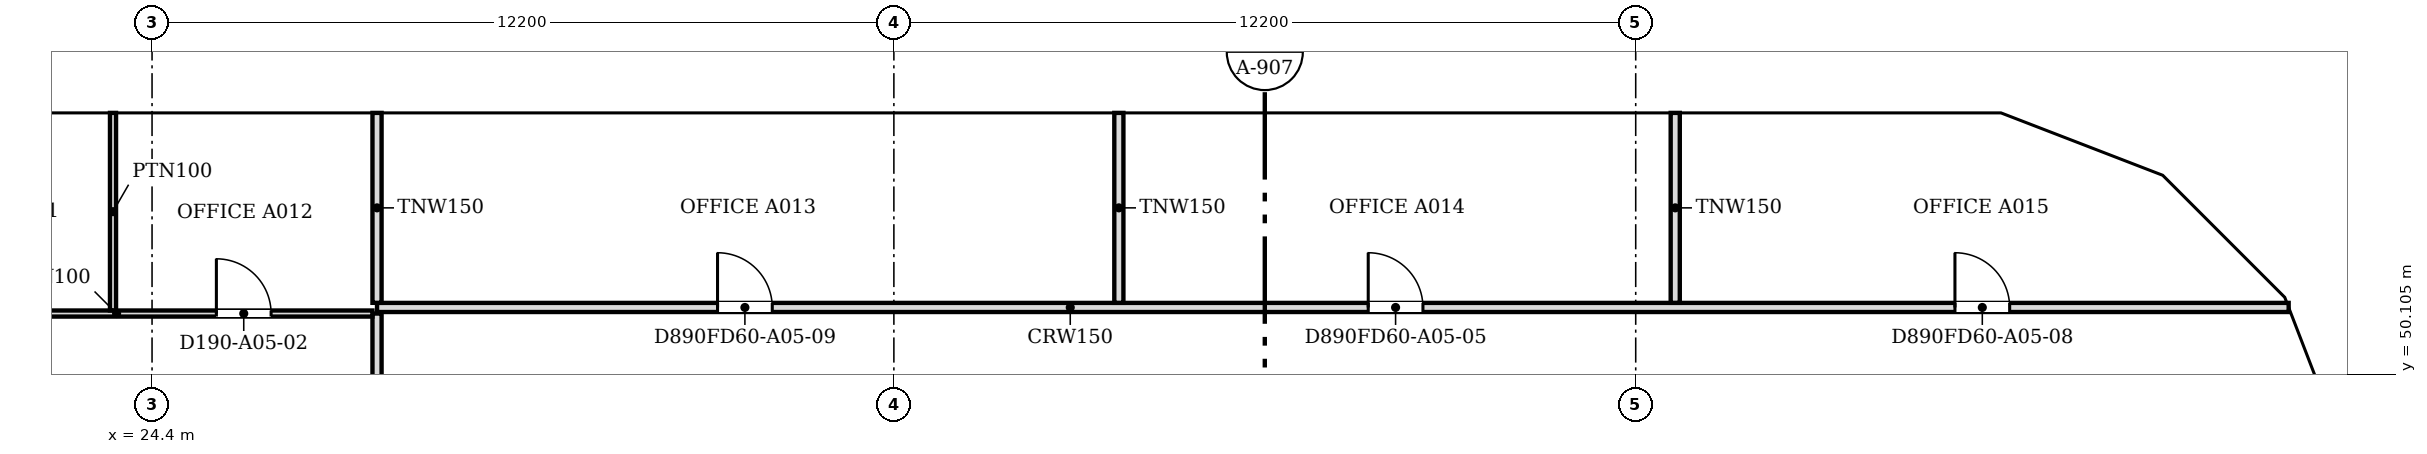
"""IFC4 building model, lengths in metres.
Left out: names, types, materials, properties, quantities, classifications, styles, units other than length and angle.
Written with IfcOpenShell. Run it as: python <this file> out.ifc"""

import sys

from ifc_helpers import new_model, si_unit, direction, frame, frame_2d, origin, place, context, subcontext, project, spatial, polyline, rectangle, outline, extrude, faceted_brep, source, transform, mapped, element, fill, save


model = new_model("IFC4")
c1 = context("Model", 3, precision=1e-05, world=origin(), true_north=direction((0.0, 1.0)))
c2 = subcontext(c1, "Body", "Model", "MODEL_VIEW")
j1 = project(units=[si_unit("LENGTHUNIT", "METRE"), si_unit("PLANEANGLEUNIT", "RADIAN")], contexts=[c1])
p1 = place(None, origin())
s1 = spatial("IfcSite", under=j1, at=p1, CompositionType="ELEMENT")
p2 = place(p1, origin())
s2 = spatial("IfcBuilding", under=s1, at=p2, CompositionType="ELEMENT")
p3 = place(p2, frame((0.0, 0.0, 56.2)))
s3 = spatial("IfcBuildingStorey", under=s2, at=p3, CompositionType="ELEMENT", Elevation=56.2)
m1 = source(origin(), c2, "Body", "Brep", [
    faceted_brep([(2.95, -0.25, 0.0), (3.003, -0.25, 0.068), (3.003, -0.25, 7.532), (2.95, -0.25, 7.6), (0.0, -0.25, 3.8), (0.047, 0.25, 3.86), (2.898, 0.25, 7.532), (2.898, 0.25, 0.068), (0.047, 0.25, 3.74), (2.95, 0.0, 0.0), (2.95, 0.0, 7.6), (0.0, 0.0, 3.8)], [[[0, 1, 2, 3, 4]], [[5, 6, 7, 8]], [[1, 0, 9]], [[10, 3, 2]], [[6, 5, 11, 4, 3, 10]], [[8, 7, 9, 0, 4, 11]], [[8, 11, 5]], [[1, 9, 7, 6, 10, 2]]]),
])
p4 = place(p3, frame((60.75, 48.753, -3.8), z_axis=(0.0, 0.0, 1.0), x_axis=(-0.35992665181, 0.932980602862, 0.0)))
e1 = element("IfcWall", 1, at=p4, inside=s3, PredefinedType="SOLIDWALL", context=c2, shape_type="MappedRepresentation", body=[
    mapped(m1, transform((0.0, 0.0, 0.0), scale=1.0)),
])
m2 = source(origin(), c2, "Body", "SweptSolid", [
    extrude(outline(polyline([(2.75, 6.935), (0.316, 3.8), (2.75, 0.665), (2.75, 6.935)])), frame((0.0, 0.26, 0.0), z_axis=(0.0, -1.0, 0.0), x_axis=(1.0, 0.0, 0.0)), (0.0, 0.0, 1.0), 0.52),
])
p5 = place(p4, origin())
e2 = element("IfcOpeningElement", 2, at=p5, cuts=e1, PredefinedType="OPENING", context=c2, shape_type="MappedRepresentation", body=[
    mapped(m2, transform((0.0, 0.0, 0.0), scale=1.0)),
])
m3 = source(origin(), c2, "Body", "Brep", [
    faceted_brep([(0.053, -0.25, 0.0), (2.997, -0.25, 3.8), (0.053, -0.25, 7.6), (0.0, -0.25, 7.532), (0.0, -0.25, 0.068), (0.106, 0.25, 7.532), (2.944, 0.25, 3.868), (2.944, 0.25, 3.732), (0.106, 0.25, 0.068), (2.997, 0.0, 3.8), (0.053, 0.0, 0.0), (0.053, 0.0, 7.6)], [[[0, 1, 2, 3, 4]], [[5, 6, 7, 8]], [[8, 7, 9, 1, 0, 10]], [[6, 5, 11, 2, 1, 9]], [[3, 2, 11]], [[10, 0, 4]], [[8, 10, 4, 3, 11, 5]], [[9, 7, 6]]]),
])
p6 = place(p3, frame((59.726, 51.469, -3.8), z_axis=(0.0, 0.0, 1.0), x_axis=(-0.707106781187, 0.707106781187, 0.0)))
e3 = element("IfcWall", 3, at=p6, inside=s3, PredefinedType="SOLIDWALL", context=c2, shape_type="MappedRepresentation", body=[
    mapped(m3, transform((0.0, 0.0, 0.0), scale=1.0)),
])
m4 = source(origin(), c2, "Body", "SweptSolid", [
    extrude(outline(polyline([(0.253, 0.667), (2.681, 3.8), (0.253, 6.934), (0.253, 0.667)])), frame((0.0, 0.26, 0.0), z_axis=(0.0, -1.0, 0.0), x_axis=(1.0, 0.0, 0.0)), (0.0, 0.0, 1.0), 0.52),
])
p7 = place(p6, origin())
e4 = element("IfcOpeningElement", 4, at=p7, cuts=e3, PredefinedType="OPENING", context=c2, shape_type="MappedRepresentation", body=[
    mapped(m4, transform((0.0, 0.0, 0.0), scale=1.0)),
])
m5 = source(origin(), c2, "Body", "Brep", [
    faceted_brep([(2.95, -0.25, 0.0), (2.997, -0.25, 0.059), (2.997, -0.25, 7.541), (2.95, -0.25, 7.6), (0.0, -0.25, 3.8), (0.053, 0.25, 3.868), (2.904, 0.25, 7.54), (2.904, 0.25, 0.06), (0.053, 0.25, 3.732), (2.95, 0.0, 0.0), (2.95, 0.0, 7.6), (0.0, 0.0, 3.8)], [[[0, 1, 2, 3, 4]], [[5, 6, 7, 8]], [[1, 0, 9]], [[10, 3, 2]], [[6, 5, 11, 4, 3, 10]], [[8, 7, 9, 0, 4, 11]], [[8, 11, 5]], [[1, 9, 7, 6, 10, 2]]]),
])
p8 = place(p3, frame((57.606, 53.588, -3.8), z_axis=(0.0, 0.0, 1.0), x_axis=(-0.932990326376, 0.359901446078, 0.0)))
e5 = element("IfcWall", 5, at=p8, inside=s3, PredefinedType="SOLIDWALL", context=c2, shape_type="MappedRepresentation", body=[
    mapped(m5, transform((0.0, 0.0, 0.0), scale=1.0)),
])
p9 = place(p8, origin())
e6 = element("IfcOpeningElement", 6, at=p9, cuts=e5, PredefinedType="OPENING", context=c2, shape_type="MappedRepresentation", body=[
    mapped(m2, transform((0.0, 0.0, 0.0), scale=1.0)),
])
m6 = source(origin(), c2, "Body", "Brep", [
    faceted_brep([(0.047, -0.25, 0.0), (3.05, -0.25, 3.8), (0.047, -0.25, 7.6), (0.0, -0.25, 7.54), (0.0, -0.25, 0.06), (0.093, 0.25, 7.541), (3.05, 0.25, 3.8), (0.093, 0.25, 0.059), (0.047, 0.0, 0.0), (0.047, 0.0, 7.6)], [[[0, 1, 2, 3, 4]], [[5, 6, 7]], [[7, 6, 1, 0, 8]], [[6, 5, 9, 2, 1]], [[3, 2, 9]], [[8, 0, 4]], [[7, 8, 4, 3, 9, 5]]]),
])
p10 = place(p3, frame((54.9, 54.65, -3.8), z_axis=(0.0, 0.0, 1.0), x_axis=(-1.0, 0.0, 0.0)))
e7 = element("IfcWall", 7, at=p10, inside=s3, PredefinedType="SOLIDWALL", context=c2, shape_type="MappedRepresentation", body=[
    mapped(m6, transform((0.0, 0.0, 0.0), scale=1.0)),
])
m7 = source(origin(), c2, "Body", "SweptSolid", [
    extrude(outline(polyline([(0.247, 0.656), (2.731, 3.8), (0.247, 6.944), (0.247, 0.656)])), frame((0.0, 0.26, 0.0), z_axis=(0.0, -1.0, 0.0), x_axis=(1.0, 0.0, 0.0)), (0.0, 0.0, 1.0), 0.52),
])
p11 = place(p10, origin())
e8 = element("IfcOpeningElement", 8, at=p11, cuts=e7, PredefinedType="OPENING", context=c2, shape_type="MappedRepresentation", body=[
    mapped(m7, transform((0.0, 0.0, 0.0), scale=1.0)),
])
m8 = source(origin(), c2, "Body", "SweptSolid", [
    extrude(outline(polyline([(3.05, 0.0), (6.1, 3.8), (3.05, 7.6), (0.0, 3.8), (3.05, 0.0)])), frame((0.0, 0.25, 0.0), z_axis=(0.0, -1.0, 0.0), x_axis=(1.0, 0.0, 0.0)), (0.0, 0.0, 1.0), 0.5),
])
p12 = place(p3, frame((51.85, 54.65, -3.8), z_axis=(0.0, 0.0, 1.0), x_axis=(-1.0, 0.0, 0.0)))
e9 = element("IfcWall", 9, at=p12, inside=s3, PredefinedType="SOLIDWALL", context=c2, shape_type="MappedRepresentation", body=[
    mapped(m8, transform((0.0, 0.0, 0.0), scale=1.0)),
])
m9 = source(origin(), c2, "Body", "SweptSolid", [
    extrude(outline(polyline([(3.05, 0.399), (5.78, 3.8), (3.05, 7.201), (0.321, 3.8), (3.05, 0.399)])), frame((0.0, 0.26, 0.0), z_axis=(0.0, -1.0, 0.0), x_axis=(1.0, 0.0, 0.0)), (0.0, 0.0, 1.0), 0.52),
])
p13 = place(p12, origin())
e10 = element("IfcOpeningElement", 10, at=p13, cuts=e9, PredefinedType="OPENING", context=c2, shape_type="MappedRepresentation", body=[
    mapped(m9, transform((0.0, 0.0, 0.0), scale=1.0)),
])
p14 = place(p3, frame((45.75, 54.65, -3.8), z_axis=(0.0, 0.0, 1.0), x_axis=(-1.0, 0.0, 0.0)))
e11 = element("IfcWall", 11, at=p14, inside=s3, PredefinedType="SOLIDWALL", context=c2, shape_type="MappedRepresentation", body=[
    mapped(m8, transform((0.0, 0.0, 0.0), scale=1.0)),
])
p15 = place(p14, origin())
e12 = element("IfcOpeningElement", 12, at=p15, cuts=e11, PredefinedType="OPENING", context=c2, shape_type="MappedRepresentation", body=[
    mapped(m9, transform((0.0, 0.0, 0.0), scale=1.0)),
])
m10 = source(origin(), c2, "Body", "Brep", [
    faceted_brep([(3.05, -0.25, 0.0), (6.1, -0.25, 3.8), (6.1, -0.25, 3.8), (3.05, -0.25, 7.6), (0.0, -0.25, 3.8), (0.0, 0.25, 3.8), (3.05, 0.25, 7.6), (6.1, 0.25, 3.8), (6.1, 0.25, 3.8), (3.05, 0.25, 0.0)], [[[0, 1, 2, 3, 4]], [[5, 6, 7, 8, 9]], [[9, 8, 1, 0]], [[7, 6, 3, 2]], [[6, 5, 4, 3]], [[5, 9, 0, 4]], [[1, 8, 7, 2]]]),
])
p16 = place(p3, frame((39.65, 54.65, -3.8), z_axis=(0.0, 0.0, 1.0), x_axis=(-1.0, 0.0, 0.0)))
e13 = element("IfcWall", 13, at=p16, inside=s3, PredefinedType="SOLIDWALL", context=c2, shape_type="MappedRepresentation", body=[
    mapped(m10, transform((0.0, 0.0, 0.0), scale=1.0)),
])
p17 = place(p16, origin())
e14 = element("IfcOpeningElement", 14, at=p17, cuts=e13, PredefinedType="OPENING", context=c2, shape_type="MappedRepresentation", body=[
    mapped(m9, transform((0.0, 0.0, 0.0), scale=1.0)),
])
p18 = place(p3, frame((33.55, 54.65, -3.8), z_axis=(0.0, 0.0, 1.0), x_axis=(-1.0, 0.0, 0.0)))
e15 = element("IfcWall", 15, at=p18, inside=s3, PredefinedType="SOLIDWALL", context=c2, shape_type="MappedRepresentation", body=[
    mapped(m8, transform((0.0, 0.0, 0.0), scale=1.0)),
])
p19 = place(p18, origin())
e16 = element("IfcOpeningElement", 16, at=p19, cuts=e15, PredefinedType="OPENING", context=c2, shape_type="MappedRepresentation", body=[
    mapped(m9, transform((0.0, 0.0, 0.0), scale=1.0)),
])
p20 = place(p3, frame((27.45, 54.65, -3.8), z_axis=(0.0, 0.0, 1.0), x_axis=(-1.0, 0.0, 0.0)))
e17 = element("IfcWall", 17, at=p20, inside=s3, PredefinedType="SOLIDWALL", context=c2, shape_type="MappedRepresentation", body=[
    mapped(m10, transform((0.0, 0.0, 0.0), scale=1.0)),
])
p21 = place(p20, origin())
e18 = element("IfcOpeningElement", 18, at=p21, cuts=e17, PredefinedType="OPENING", context=c2, shape_type="MappedRepresentation", body=[
    mapped(m9, transform((0.0, 0.0, 0.0), scale=1.0)),
])
p22 = place(p2, frame((0.0, 0.0, 60.0)))
s4 = spatial("IfcBuildingStorey", under=s2, at=p22, CompositionType="ELEMENT", Elevation=60.0)
m11 = source(origin(), c2, "Body", "Brep", [
    faceted_brep([(0.047, -0.25, 0.0), (2.997, -0.25, 3.8), (0.047, -0.25, 7.6), (0.0, -0.25, 7.541), (0.0, -0.25, 0.059), (0.093, 0.25, 7.54), (2.944, 0.25, 3.868), (2.944, 0.25, 3.732), (0.093, 0.25, 0.06), (2.997, 0.0, 3.8), (0.047, 0.0, 0.0), (0.047, 0.0, 7.6)], [[[0, 1, 2, 3, 4]], [[5, 6, 7, 8]], [[8, 7, 9, 1, 0, 10]], [[6, 5, 11, 2, 1, 9]], [[3, 2, 11]], [[10, 0, 4]], [[8, 10, 4, 3, 11, 5]], [[9, 7, 6]]]),
])
p23 = place(p22, frame((60.767, 48.71, -3.8), z_axis=(0.0, 0.0, 1.0), x_axis=(-0.359901446078, 0.932990326376, 0.0)))
e19 = element("IfcWall", 19, at=p23, inside=s4, PredefinedType="SOLIDWALL", context=c2, shape_type="MappedRepresentation", body=[
    mapped(m11, transform((0.0, 0.0, 0.0), scale=1.0)),
])
m12 = source(origin(), c2, "Body", "SweptSolid", [
    extrude(outline(polyline([(0.247, 0.665), (2.681, 3.8), (0.247, 6.935), (0.247, 0.665)])), frame((0.0, 0.26, 0.0), z_axis=(0.0, -1.0, 0.0), x_axis=(1.0, 0.0, 0.0)), (0.0, 0.0, 1.0), 0.52),
])
p24 = place(p23, origin())
e20 = element("IfcOpeningElement", 20, at=p24, cuts=e19, PredefinedType="OPENING", context=c2, shape_type="MappedRepresentation", body=[
    mapped(m12, transform((0.0, 0.0, 0.0), scale=1.0)),
])
m13 = source(origin(), c2, "Body", "Brep", [
    faceted_brep([(2.944, -0.25, 0.0), (2.997, -0.25, 0.068), (2.997, -0.25, 7.532), (2.944, -0.25, 7.6), (0.0, -0.25, 3.8), (0.053, 0.25, 3.868), (2.891, 0.25, 7.532), (2.891, 0.25, 0.068), (0.053, 0.25, 3.732), (2.944, 0.0, 0.0), (2.944, 0.0, 7.6), (0.0, 0.0, 3.8)], [[[0, 1, 2, 3, 4]], [[5, 6, 7, 8]], [[1, 0, 9]], [[10, 3, 2]], [[6, 5, 11, 4, 3, 10]], [[8, 7, 9, 0, 4, 11]], [[8, 11, 5]], [[1, 9, 7, 6, 10, 2]]]),
])
p25 = place(p22, frame((59.688, 51.506, -3.8), z_axis=(0.0, 0.0, 1.0), x_axis=(-0.707106781187, 0.707106781187, 0.0)))
e21 = element("IfcWall", 21, at=p25, inside=s4, PredefinedType="SOLIDWALL", context=c2, shape_type="MappedRepresentation", body=[
    mapped(m13, transform((0.0, 0.0, 0.0), scale=1.0)),
])
m14 = source(origin(), c2, "Body", "SweptSolid", [
    extrude(outline(polyline([(2.744, 6.934), (0.316, 3.8), (2.744, 0.666), (2.744, 6.934)])), frame((0.0, 0.26, 0.0), z_axis=(0.0, -1.0, 0.0), x_axis=(1.0, 0.0, 0.0)), (0.0, 0.0, 1.0), 0.52),
])
p26 = place(p25, origin())
e22 = element("IfcOpeningElement", 22, at=p26, cuts=e21, PredefinedType="OPENING", context=c2, shape_type="MappedRepresentation", body=[
    mapped(m14, transform((0.0, 0.0, 0.0), scale=1.0)),
])
m15 = source(origin(), c2, "Body", "Brep", [
    faceted_brep([(0.053, -0.25, 0.0), (3.003, -0.25, 3.8), (0.053, -0.25, 7.6), (0.0, -0.25, 7.532), (0.0, -0.25, 0.068), (0.106, 0.25, 7.532), (2.957, 0.25, 3.86), (2.957, 0.25, 3.74), (0.106, 0.25, 0.068), (3.003, 0.0, 3.8), (0.053, 0.0, 0.0), (0.053, 0.0, 7.6)], [[[0, 1, 2, 3, 4]], [[5, 6, 7, 8]], [[8, 7, 9, 1, 0, 10]], [[6, 5, 11, 2, 1, 9]], [[3, 2, 11]], [[10, 0, 4]], [[8, 10, 4, 3, 11, 5]], [[9, 7, 6]]]),
])
p27 = place(p22, frame((57.656, 53.569, -3.8), z_axis=(0.0, 0.0, 1.0), x_axis=(-0.933007896601, 0.359855894603, 0.0)))
e23 = element("IfcWall", 23, at=p27, inside=s4, PredefinedType="SOLIDWALL", context=c2, shape_type="MappedRepresentation", body=[
    mapped(m15, transform((0.0, 0.0, 0.0), scale=1.0)),
])
m16 = source(origin(), c2, "Body", "SweptSolid", [
    extrude(outline(polyline([(0.253, 0.665), (2.687, 3.8), (0.253, 6.935), (0.253, 0.665)])), frame((0.0, 0.26, 0.0), z_axis=(0.0, -1.0, 0.0), x_axis=(1.0, 0.0, 0.0)), (0.0, 0.0, 1.0), 0.52),
])
p28 = place(p27, origin())
e24 = element("IfcOpeningElement", 24, at=p28, cuts=e23, PredefinedType="OPENING", context=c2, shape_type="MappedRepresentation", body=[
    mapped(m16, transform((0.0, 0.0, 0.0), scale=1.0)),
])
m17 = source(origin(), c2, "Body", "Brep", [
    faceted_brep([(3.003, -0.25, 0.0), (6.053, -0.25, 3.8), (3.003, -0.25, 7.6), (0.0, -0.25, 3.8), (0.047, 0.25, 3.859), (3.003, 0.25, 7.6), (6.053, 0.25, 3.8), (3.003, 0.25, 0.0), (0.047, 0.25, 3.741), (0.0, 0.0, 3.8)], [[[0, 1, 2, 3]], [[4, 5, 6, 7, 8]], [[7, 6, 1, 0]], [[6, 5, 2, 1]], [[5, 4, 9, 3, 2]], [[8, 7, 0, 3, 9]], [[8, 9, 4]]]),
])
p29 = place(p22, frame((54.854, 54.65, -3.8), z_axis=(0.0, 0.0, 1.0), x_axis=(-1.0, 0.0, 0.0)))
e25 = element("IfcWall", 25, at=p29, inside=s4, PredefinedType="SOLIDWALL", context=c2, shape_type="MappedRepresentation", body=[
    mapped(m17, transform((0.0, 0.0, 0.0), scale=1.0)),
])
m18 = source(origin(), c2, "Body", "SweptSolid", [
    extrude(outline(polyline([(3.005, 0.401), (5.733, 3.8), (3.005, 7.199), (0.319, 3.8), (3.005, 0.401)])), frame((0.0, 0.26, 0.0), z_axis=(0.0, -1.0, 0.0), x_axis=(1.0, 0.0, 0.0)), (0.0, 0.0, 1.0), 0.52),
])
p30 = place(p29, origin())
e26 = element("IfcOpeningElement", 26, at=p30, cuts=e25, PredefinedType="OPENING", context=c2, shape_type="MappedRepresentation", body=[
    mapped(m18, transform((0.0, 0.0, 0.0), scale=1.0)),
])
p31 = place(p22, frame((48.8, 54.65, -3.8), z_axis=(0.0, 0.0, 1.0), x_axis=(-1.0, 0.0, 0.0)))
e27 = element("IfcWall", 27, at=p31, inside=s4, PredefinedType="SOLIDWALL", context=c2, shape_type="MappedRepresentation", body=[
    mapped(m8, transform((0.0, 0.0, 0.0), scale=1.0)),
])
p32 = place(p31, origin())
e28 = element("IfcOpeningElement", 28, at=p32, cuts=e27, PredefinedType="OPENING", context=c2, shape_type="MappedRepresentation", body=[
    mapped(m9, transform((0.0, 0.0, 0.0), scale=1.0)),
])
p33 = place(p22, frame((42.7, 54.65, -3.8), z_axis=(0.0, 0.0, 1.0), x_axis=(-1.0, 0.0, 0.0)))
e29 = element("IfcWall", 29, at=p33, inside=s4, PredefinedType="SOLIDWALL", context=c2, shape_type="MappedRepresentation", body=[
    mapped(m10, transform((0.0, 0.0, 0.0), scale=1.0)),
])
p34 = place(p33, origin())
e30 = element("IfcOpeningElement", 30, at=p34, cuts=e29, PredefinedType="OPENING", context=c2, shape_type="MappedRepresentation", body=[
    mapped(m9, transform((0.0, 0.0, 0.0), scale=1.0)),
])
p35 = place(p22, frame((36.6, 54.65, -3.8), z_axis=(0.0, 0.0, 1.0), x_axis=(-1.0, 0.0, 0.0)))
e31 = element("IfcWall", 31, at=p35, inside=s4, PredefinedType="SOLIDWALL", context=c2, shape_type="MappedRepresentation", body=[
    mapped(m8, transform((0.0, 0.0, 0.0), scale=1.0)),
])
p36 = place(p35, origin())
e32 = element("IfcOpeningElement", 32, at=p36, cuts=e31, PredefinedType="OPENING", context=c2, shape_type="MappedRepresentation", body=[
    mapped(m9, transform((0.0, 0.0, 0.0), scale=1.0)),
])
p37 = place(p22, frame((30.5, 54.65, -3.8), z_axis=(0.0, 0.0, 1.0), x_axis=(-1.0, 0.0, 0.0)))
e33 = element("IfcWall", 33, at=p37, inside=s4, PredefinedType="SOLIDWALL", context=c2, shape_type="MappedRepresentation", body=[
    mapped(m8, transform((0.0, 0.0, 0.0), scale=1.0)),
])
p38 = place(p37, origin())
e34 = element("IfcOpeningElement", 34, at=p38, cuts=e33, PredefinedType="OPENING", context=c2, shape_type="MappedRepresentation", body=[
    mapped(m9, transform((0.0, 0.0, 0.0), scale=1.0)),
])
p39 = place(p22, frame((24.4, 54.65, -3.8), z_axis=(0.0, 0.0, 1.0), x_axis=(-1.0, 0.0, 0.0)))
e35 = element("IfcWall", 35, at=p39, inside=s4, PredefinedType="SOLIDWALL", context=c2, shape_type="MappedRepresentation", body=[
    mapped(m10, transform((0.0, 0.0, 0.0), scale=1.0)),
])
p40 = place(p39, origin())
e36 = element("IfcOpeningElement", 36, at=p40, cuts=e35, PredefinedType="OPENING", context=c2, shape_type="MappedRepresentation", body=[
    mapped(m9, transform((0.0, 0.0, 0.0), scale=1.0)),
])
p41 = place(p3, frame((28.1, 47.776, 0.0), z_axis=(0.0, 0.0, 1.0), x_axis=(0.0, 1.0, 0.0)))
e37 = element("IfcWall", 37, at=p41, inside=s3, PredefinedType="PARTITIONING", context=c2, shape_type="SweptSolid", body=[
    extrude(rectangle(XDim=3.324, YDim=0.15, at=frame_2d((1.662, 0.0))), origin(), (0.0, 0.0, 1.0), 3.067),
])
p42 = place(p3, frame((19.776, 51.1, 0.0), z_axis=(0.0, 0.0, 1.0), x_axis=(1.0, 0.0, 0.0)))
e38 = element("IfcWall", 38, at=p42, inside=s3, PredefinedType="PARTITIONING", context=c2, shape_type="SweptSolid", body=[
    extrude(rectangle(XDim=8.248, YDim=0.1, at=frame_2d((4.124, 0.0))), origin(), (0.0, 0.0, 1.0), 3.067),
])
m19 = source(origin(), c2, "Body", "SweptSolid", [
    extrude(rectangle(XDim=0.9, YDim=2.1, at=frame_2d((0.45, 1.05))), frame((0.0, 0.06, 0.0), z_axis=(0.0, -1.0, 0.0), x_axis=(1.0, 0.0, 0.0)), (0.0, 0.0, 1.0), 0.12),
])
p43 = place(p42, frame((1.5, 0.0, 0.0)))
e39 = element("IfcOpeningElement", 39, at=p43, cuts=e38, PredefinedType="OPENING", context=c2, shape_type="MappedRepresentation", body=[
    mapped(m19, transform((0.0, 0.0, 0.0), scale=1.0)),
])
p44 = place(p42, frame((5.682, 0.0, 0.0)))
e40 = element("IfcOpeningElement", 40, at=p44, cuts=e38, PredefinedType="OPENING", context=c2, shape_type="MappedRepresentation", body=[
    mapped(m19, transform((0.0, 0.0, 0.0), scale=1.0)),
])
p45 = place(p3, frame((23.758, 51.151, 0.0), z_axis=(0.0, 0.0, 1.0), x_axis=(0.0, 1.0, 0.0)))
e41 = element("IfcWall", 41, at=p45, inside=s3, PredefinedType="PARTITIONING", context=c2, shape_type="SweptSolid", body=[
    extrude(rectangle(XDim=3.249, YDim=0.1, at=frame_2d((1.625, 0.0))), origin(), (0.0, 0.0, 1.0), 3.067),
])
p46 = place(p3, frame((28.1, 51.2, 0.0), z_axis=(0.0, 0.0, 1.0), x_axis=(1.0, 0.0, 0.0)))
e42 = element("IfcWall", 42, at=p46, inside=s3, PredefinedType="PARTITIONING", context=c2, shape_type="SweptSolid", body=[
    extrude(rectangle(XDim=31.438, YDim=0.15, at=frame_2d((15.719, 0.0))), origin(), (0.0, 0.0, 1.0), 3.067),
])
m20 = source(origin(), c2, "Body", "SweptSolid", [
    extrude(rectangle(XDim=0.9, YDim=2.1, at=frame_2d((0.45, 1.05))), frame((0.0, 0.085, 0.0), z_axis=(0.0, -1.0, 0.0), x_axis=(1.0, 0.0, 0.0)), (0.0, 0.0, 1.0), 0.17),
])
p47 = place(p46, frame((16.301, 0.0, 0.0)))
e43 = element("IfcOpeningElement", 43, at=p47, cuts=e42, PredefinedType="OPENING", context=c2, shape_type="MappedRepresentation", body=[
    mapped(m20, transform((0.0, 0.0, 0.0), scale=1.0)),
])
p48 = place(p46, frame((25.95, 0.0, 0.0)))
e44 = element("IfcOpeningElement", 44, at=p48, cuts=e42, PredefinedType="OPENING", context=c2, shape_type="MappedRepresentation", body=[
    mapped(m20, transform((0.0, 0.0, 0.0), scale=1.0)),
])
p49 = place(p46, frame((5.6, 0.0, 0.0)))
e45 = element("IfcOpeningElement", 45, at=p49, cuts=e42, PredefinedType="OPENING", context=c2, shape_type="MappedRepresentation", body=[
    mapped(m20, transform((0.0, 0.0, 0.0), scale=1.0)),
])
for number, where, z_axis, x_axis in (
    (46, (28.1, 51.276, 0.0), (0.0, 0.0, 1.0), (0.0, 1.0, 0.0)),
    (47, (40.3, 51.276, 0.0), (0.0, 0.0, 1.0), (0.0, 1.0, 0.0)),
    (48, (49.45, 51.276, 0.0), (0.0, 0.0, 1.0), (0.0, 1.0, 0.0)),
):
    element("IfcWall", number, at=place(p3, frame(where, z_axis=z_axis, x_axis=x_axis)), inside=s3, PredefinedType="PARTITIONING", context=c2, shape_type="SweptSolid", body=[
        extrude(rectangle(XDim=3.124, YDim=0.15, at=frame_2d((1.562, 0.0))), origin(), (0.0, 0.0, 1.0), 3.067),
    ])
m21 = source(origin(), c2, "Body", "SweptSolid", [
    extrude(rectangle(XDim=0.9, YDim=2.1, at=frame_2d((0.45, 1.05))), frame((0.0, 0.025, 0.0), z_axis=(0.0, -1.0, 0.0), x_axis=(1.0, 0.0, 0.0)), (0.0, 0.0, 1.0), 0.05),
])
p50 = place(p44, origin())
e49 = element("IfcDoor", 49, at=p50, inside=s3, OperationType="SINGLE_SWING_LEFT", PredefinedType="DOOR", context=c2, shape_type="MappedRepresentation", body=[
    mapped(m21, transform((0.0, 0.0, 0.0), scale=1.0)),
])
fill(e40, e49)
p51 = place(p47, origin())
e50 = element("IfcDoor", 50, at=p51, inside=s3, OperationType="SINGLE_SWING_LEFT", PredefinedType="DOOR", context=c2, shape_type="MappedRepresentation", body=[
    mapped(m21, transform((0.0, 0.0, 0.0), scale=1.0)),
])
fill(e43, e50)
p52 = place(p48, origin())
e51 = element("IfcDoor", 51, at=p52, inside=s3, OperationType="SINGLE_SWING_LEFT", PredefinedType="DOOR", context=c2, shape_type="MappedRepresentation", body=[
    mapped(m21, transform((0.0, 0.0, 0.0), scale=1.0)),
])
fill(e44, e51)
p53 = place(p49, origin())
e52 = element("IfcDoor", 52, at=p53, inside=s3, OperationType="SINGLE_SWING_LEFT", PredefinedType="DOOR", context=c2, shape_type="MappedRepresentation", body=[
    mapped(m21, transform((0.0, 0.0, 0.0), scale=1.0)),
])
fill(e45, e52)
save(model, sys.argv[1])
